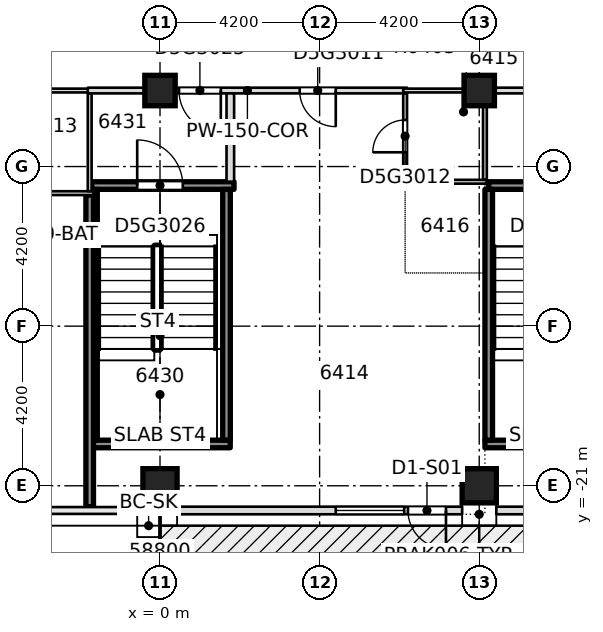
"""IFC4 building model, lengths in metres.
Left out: names, types, materials, properties, quantities, classifications, styles, units other than length and angle.
Written with IfcOpenShell. Run it as: python <this file> out.ifc"""

import sys

from ifc_helpers import new_model, si_unit, direction, frame, frame_2d, origin, origin_2d, place, context, subcontext, project, spatial, rectangle, extrude, element, fill, save


model = new_model("IFC4")
c1 = context("Model", 3, precision=1e-05, world=origin(), true_north=direction((0.0, 1.0)))
c2 = subcontext(c1, "Body", "Model", "MODEL_VIEW")
j1 = project(units=[si_unit("LENGTHUNIT", "METRE"), si_unit("PLANEANGLEUNIT", "RADIAN")], contexts=[c1])
p1 = place(None, origin())
s1 = spatial("IfcSite", under=j1, at=p1, CompositionType="ELEMENT")
p2 = place(p1, origin())
s2 = spatial("IfcBuilding", under=s1, at=p2, CompositionType="ELEMENT")
p3 = place(p2, frame((0.0, 0.0, 244.15)))
s3 = spatial("IfcBuildingStorey", under=s2, at=p3, CompositionType="ELEMENT", Elevation=244.15)
for number, where, z_axis, x_axis in (
    (1, (0.0, -21.0, -0.4), (0.0, 0.0, 1.0), (1.0, 0.0, 0.0)),
    (2, (8.4, -21.0, -0.4), (0.0, 0.0, 1.0), (1.0, 0.0, 0.0)),
):
    element("IfcColumn", number, at=place(p3, frame(where, z_axis=z_axis, x_axis=x_axis)), inside=s3, PredefinedType="COLUMN", context=c2, shape_type="SweptSolid", body=[
        extrude(rectangle(XDim=0.9, YDim=0.9, at=origin_2d()), origin(), (0.0, 0.0, 1.0), 3.45),
    ])
for number, where, z_axis, x_axis in (
    (3, (0.0, -10.6, -0.4), (0.0, 0.0, 1.0), (1.0, 0.0, 0.0)),
    (4, (8.4, -10.6, -0.4), (0.0, 0.0, 1.0), (1.0, 0.0, 0.0)),
):
    element("IfcColumn", number, at=place(p3, frame(where, z_axis=z_axis, x_axis=x_axis)), inside=s3, PredefinedType="COLUMN", context=c2, shape_type="SweptSolid", body=[
        extrude(rectangle(XDim=0.8, YDim=0.8, at=origin_2d()), origin(), (0.0, 0.0, 1.0), 3.45),
    ])
p4 = place(p3, frame((-1.848, -19.9, 0.0), z_axis=(0.0, 0.0, 1.0), x_axis=(1.0, 0.0, 0.0)))
e5 = element("IfcWall", 5, at=p4, inside=s3, PredefinedType="SOLIDWALL", context=c2, shape_type="SweptSolid", body=[
    extrude(rectangle(XDim=3.696, YDim=0.2, at=frame_2d((1.848, 0.0))), origin(), (0.0, 0.0, 1.0), 3.05),
])
p5 = place(p3, frame((-4.6, -13.3, 0.0), z_axis=(0.0, 0.0, 1.0), x_axis=(1.0, 0.0, 0.0)))
e6 = element("IfcWall", 6, at=p5, inside=s3, PredefinedType="PARTITIONING", context=c2, shape_type="SweptSolid", body=[
    extrude(rectangle(XDim=2.85, YDim=0.1, at=frame_2d((1.425, 0.0))), origin(), (0.0, 0.0, 1.0), 3.05),
])
p6 = place(p5, frame((0.25, 0.0, 0.0)))
e7 = element("IfcOpeningElement", 7, at=p6, cuts=e6, PredefinedType="OPENING", context=c2, shape_type="SweptSolid", body=[
    extrude(rectangle(XDim=0.85, YDim=2.1, at=frame_2d((0.425, 1.05))), frame((0.0, 0.06, 0.0), z_axis=(0.0, -1.0, 0.0), x_axis=(1.0, 0.0, 0.0)), (0.0, 0.0, 1.0), 0.12),
])
p7 = place(p3, frame((-1.798, -13.1, 0.0), z_axis=(0.0, 0.0, 1.0), x_axis=(1.0, 0.0, 0.0)))
e8 = element("IfcWall", 8, at=p7, inside=s3, PredefinedType="SOLIDWALL", context=c2, shape_type="SweptSolid", body=[
    extrude(rectangle(XDim=3.746, YDim=0.2, at=frame_2d((1.873, 0.0))), origin(), (0.0, 0.0, 1.0), 3.05),
])
p8 = place(p7, frame((1.198, 0.0, 0.0)))
e9 = element("IfcOpeningElement", 9, at=p8, cuts=e8, PredefinedType="OPENING", context=c2, shape_type="SweptSolid", body=[
    extrude(rectangle(XDim=1.2, YDim=2.1, at=frame_2d((0.6, 1.05))), frame((0.0, 0.11, 0.0), z_axis=(0.0, -1.0, 0.0), x_axis=(1.0, 0.0, 0.0)), (0.0, 0.0, 1.0), 0.22),
])
p9 = place(p3, frame((8.65, -13.1, 0.0), z_axis=(0.0, 0.0, 1.0), x_axis=(1.0, 0.0, 0.0)))
e10 = element("IfcWall", 10, at=p9, inside=s3, PredefinedType="SOLIDWALL", context=c2, shape_type="SweptSolid", body=[
    extrude(rectangle(XDim=3.5, YDim=0.2, at=frame_2d((1.75, 0.0))), origin(), (0.0, 0.0, 1.0), 3.05),
])
p10 = place(p9, frame((1.15, 0.0, 0.0)))
e11 = element("IfcOpeningElement", 11, at=p10, cuts=e10, PredefinedType="OPENING", context=c2, shape_type="SweptSolid", body=[
    extrude(rectangle(XDim=1.2, YDim=2.1, at=frame_2d((0.6, 1.05))), frame((0.0, 0.11, 0.0), z_axis=(0.0, -1.0, 0.0), x_axis=(1.0, 0.0, 0.0)), (0.0, 0.0, 1.0), 0.22),
])
p11 = place(p3, frame((6.4, -13.0, 0.0), z_axis=(0.0, 0.0, 1.0), x_axis=(1.0, 0.0, 0.0)))
e12 = element("IfcWall", 12, at=p11, inside=s3, PredefinedType="PARTITIONING", context=c2, shape_type="SweptSolid", body=[
    extrude(rectangle(XDim=2.2, YDim=0.1, at=frame_2d((1.1, 0.0))), origin(), (0.0, 0.0, 1.0), 3.05),
])
p12 = place(p3, frame((-4.6, -10.6, 0.0), z_axis=(0.0, 0.0, 1.0), x_axis=(1.0, 0.0, 0.0)))
e13 = element("IfcWall", 13, at=p12, inside=s3, PredefinedType="PARTITIONING", context=c2, shape_type="SweptSolid", body=[
    extrude(rectangle(XDim=2.8, YDim=0.1, at=frame_2d((1.4, 0.0))), origin(), (0.0, 0.0, 1.0), 3.05),
])
p13 = place(p3, frame((-1.9, -10.6, 0.0), z_axis=(0.0, 0.0, 1.0), x_axis=(1.0, 0.0, 0.0)))
e14 = element("IfcWall", 14, at=p13, inside=s3, PredefinedType="PARTITIONING", context=c2, shape_type="SweptSolid", body=[
    extrude(rectangle(XDim=8.4, YDim=0.15, at=frame_2d((4.2, 0.0))), origin(), (0.0, 0.0, 1.0), 3.05),
])
p14 = place(p13, frame((5.575, 0.0, 0.0)))
e15 = element("IfcOpeningElement", 15, at=p14, cuts=e14, PredefinedType="OPENING", context=c2, shape_type="SweptSolid", body=[
    extrude(rectangle(XDim=0.95, YDim=2.1, at=frame_2d((0.475, 1.05))), frame((0.0, 0.085, 0.0), z_axis=(0.0, -1.0, 0.0), x_axis=(1.0, 0.0, 0.0)), (0.0, 0.0, 1.0), 0.17),
])
p15 = place(p13, frame((2.4, 0.0, 0.0)))
e16 = element("IfcOpeningElement", 16, at=p15, cuts=e14, PredefinedType="OPENING", context=c2, shape_type="SweptSolid", body=[
    extrude(rectangle(XDim=1.1, YDim=2.1, at=frame_2d((0.55, 1.05))), frame((0.0, 0.085, 0.0), z_axis=(0.0, -1.0, 0.0), x_axis=(1.0, 0.0, 0.0)), (0.0, 0.0, 1.0), 0.17),
])
p16 = place(p3, frame((6.4, -10.6, 0.0), z_axis=(0.0, 0.0, 1.0), x_axis=(1.0, 0.0, 0.0)))
e17 = element("IfcWall", 17, at=p16, inside=s3, PredefinedType="PARTITIONING", context=c2, shape_type="SweptSolid", body=[
    extrude(rectangle(XDim=2.2, YDim=0.1, at=frame_2d((1.1, 0.0))), origin(), (0.0, 0.0, 1.0), 3.05),
])
p17 = place(p3, frame((8.5, -10.6, 0.0), z_axis=(0.0, 0.0, 1.0), x_axis=(1.0, 0.0, 0.0)))
e18 = element("IfcWall", 18, at=p17, inside=s3, PredefinedType="PARTITIONING", context=c2, shape_type="SweptSolid", body=[
    extrude(rectangle(XDim=3.75, YDim=0.15, at=frame_2d((1.875, 0.0))), origin(), (0.0, 0.0, 1.0), 3.05),
])
p18 = place(p17, frame((1.35, 0.0, 0.0)))
e19 = element("IfcOpeningElement", 19, at=p18, cuts=e18, PredefinedType="OPENING", context=c2, shape_type="SweptSolid", body=[
    extrude(rectangle(XDim=1.1, YDim=2.1, at=frame_2d((0.55, 1.05))), frame((0.0, 0.085, 0.0), z_axis=(0.0, -1.0, 0.0), x_axis=(1.0, 0.0, 0.0)), (0.0, 0.0, 1.0), 0.17),
])
p19 = place(p3, frame((-1.85, -13.25, 0.0), z_axis=(0.0, 0.0, 1.0), x_axis=(0.0, 1.0, 0.0)))
e20 = element("IfcWall", 20, at=p19, inside=s3, PredefinedType="PARTITIONING", context=c2, shape_type="SweptSolid", body=[
    extrude(rectangle(XDim=2.575, YDim=0.1, at=frame_2d((1.288, 0.0))), origin(), (0.0, 0.0, 1.0), 3.05),
])
for number, where, z_axis, x_axis in (
    (21, (-1.75, -19.798, 0.0), (0.0, 0.0, 1.0), (0.0, 1.0, 0.0)),
    (22, (1.75, -19.798, 0.0), (0.0, 0.0, 1.0), (0.0, 1.0, 0.0)),
):
    element("IfcWall", number, at=place(p3, frame(where, z_axis=z_axis, x_axis=x_axis)), inside=s3, PredefinedType="SOLIDWALL", context=c2, shape_type="SweptSolid", body=[
        extrude(rectangle(XDim=6.596, YDim=0.2, at=frame_2d((3.298, 0.0))), origin(), (0.0, 0.0, 1.0), 3.05),
    ])
p20 = place(p3, frame((1.85, -12.998, 0.0), z_axis=(0.0, 0.0, 1.0), x_axis=(0.0, 1.0, 0.0)))
e23 = element("IfcWall", 23, at=p20, inside=s3, PredefinedType="PARTITIONING", context=c2, shape_type="SweptSolid", body=[
    extrude(rectangle(XDim=2.323, YDim=0.2, at=frame_2d((1.162, 0.0))), origin(), (0.0, 0.0, 1.0), 3.05),
])
p21 = place(p3, frame((6.45, -12.95, 0.0), z_axis=(0.0, 0.0, 1.0), x_axis=(0.0, 1.0, 0.0)))
e24 = element("IfcWall", 24, at=p21, inside=s3, PredefinedType="PARTITIONING", context=c2, shape_type="SweptSolid", body=[
    extrude(rectangle(XDim=2.275, YDim=0.1, at=frame_2d((1.137, 0.0))), origin(), (0.0, 0.0, 1.0), 3.05),
])
p22 = place(p21, frame((0.725, 0.0, 0.0)))
e25 = element("IfcOpeningElement", 25, at=p22, cuts=e24, PredefinedType="OPENING", context=c2, shape_type="SweptSolid", body=[
    extrude(rectangle(XDim=0.85, YDim=2.1, at=frame_2d((0.425, 1.05))), frame((0.0, 0.06, 0.0), z_axis=(0.0, -1.0, 0.0), x_axis=(1.0, 0.0, 0.0)), (0.0, 0.0, 1.0), 0.12),
])
p23 = place(p3, frame((8.55, -12.95, 0.0), z_axis=(0.0, 0.0, 1.0), x_axis=(0.0, 1.0, 0.0)))
e26 = element("IfcWall", 26, at=p23, inside=s3, PredefinedType="PARTITIONING", context=c2, shape_type="SweptSolid", body=[
    extrude(rectangle(XDim=2.275, YDim=0.1, at=frame_2d((1.137, 0.0))), origin(), (0.0, 0.0, 1.0), 3.05),
])
p24 = place(p3, frame((0.45, -21.65, 0.0), z_axis=(0.0, 0.0, 1.0), x_axis=(1.0, 0.0, 0.0)))
e27 = element("IfcWall", 27, at=p24, inside=s3, PredefinedType="STANDARD", context=c2, shape_type="SweptSolid", body=[
    extrude(rectangle(XDim=7.5, YDim=0.2, at=frame_2d((3.75, 0.0))), origin(), (0.0, 0.0, 1.0), 3.05),
])
p25 = place(p24, frame((4.175, 0.0, 0.2)))
e28 = element("IfcOpeningElement", 28, at=p25, cuts=e27, PredefinedType="OPENING", context=c2, shape_type="SweptSolid", body=[
    extrude(rectangle(XDim=1.8, YDim=2.65, at=frame_2d((0.9, 1.325))), frame((0.0, 0.11, 0.0), z_axis=(0.0, -1.0, 0.0), x_axis=(1.0, 0.0, 0.0)), (0.0, 0.0, 1.0), 0.22),
])
p26 = place(p24, frame((6.075, 0.0, 0.0)))
e29 = element("IfcOpeningElement", 29, at=p26, cuts=e27, PredefinedType="OPENING", context=c2, shape_type="SweptSolid", body=[
    extrude(rectangle(XDim=1.0, YDim=2.4, at=frame_2d((0.5, 1.2))), frame((0.0, 0.11, 0.0), z_axis=(0.0, -1.0, 0.0), x_axis=(1.0, 0.0, 0.0)), (0.0, 0.0, 1.0), 0.22),
])
p27 = place(p3, frame((8.85, -21.65, 0.0), z_axis=(0.0, 0.0, 1.0), x_axis=(1.0, 0.0, 0.0)))
e30 = element("IfcWall", 30, at=p27, inside=s3, PredefinedType="STANDARD", context=c2, shape_type="SweptSolid", body=[
    extrude(rectangle(XDim=6.7, YDim=0.2, at=frame_2d((3.35, 0.0))), origin(), (0.0, 0.0, 1.0), 3.05),
])
p28 = place(p27, frame((4.725, 0.0, 0.0)))
e31 = element("IfcOpeningElement", 31, at=p28, cuts=e30, PredefinedType="OPENING", context=c2, shape_type="SweptSolid", body=[
    extrude(rectangle(XDim=1.0, YDim=2.4, at=frame_2d((0.5, 1.2))), frame((0.0, 0.11, 0.0), z_axis=(0.0, -1.0, 0.0), x_axis=(1.0, 0.0, 0.0)), (0.0, 0.0, 1.0), 0.22),
])
p29 = place(p3, frame((8.55, -19.9, 0.0), z_axis=(0.0, 0.0, 1.0), x_axis=(1.0, 0.0, 0.0)))
e32 = element("IfcWall", 32, at=p29, inside=s3, PredefinedType="SOLIDWALL", context=c2, shape_type="SweptSolid", body=[
    extrude(rectangle(XDim=3.7, YDim=0.2, at=frame_2d((1.85, 0.0))), origin(), (0.0, 0.0, 1.0), 3.05),
])
p30 = place(p3, frame((8.65, -19.8, 0.0), z_axis=(0.0, 0.0, 1.0), x_axis=(0.0, 1.0, 0.0)))
e33 = element("IfcWall", 33, at=p30, inside=s3, PredefinedType="SOLIDWALL", context=c2, shape_type="SweptSolid", body=[
    extrude(rectangle(XDim=6.6, YDim=0.2, at=frame_2d((3.3, 0.0))), origin(), (0.0, 0.0, 1.0), 3.05),
])
p31 = place(p3, frame((-1.85, -21.55, 0.0), z_axis=(0.0, 0.0, 1.0), x_axis=(0.0, 1.0, 0.0)))
e34 = element("IfcWall", 34, at=p31, inside=s3, PredefinedType="SOLIDWALL", context=c2, shape_type="SweptSolid", body=[
    extrude(rectangle(XDim=8.2, YDim=0.2, at=frame_2d((4.1, 0.0))), origin(), (0.0, 0.0, 1.0), 3.05),
])
p32 = place(p14, origin())
e35 = element("IfcDoor", 35, at=p32, inside=s3, OperationType="SINGLE_SWING_LEFT", PredefinedType="DOOR", context=c2, shape_type="SweptSolid", body=[
    extrude(rectangle(XDim=0.95, YDim=2.1, at=frame_2d((0.475, 1.05))), frame((0.0, 0.025, 0.0), z_axis=(0.0, -1.0, 0.0), x_axis=(1.0, 0.0, 0.0)), (0.0, 0.0, 1.0), 0.05),
])
fill(e15, e35)
p33 = place(p22, origin())
e36 = element("IfcDoor", 36, at=p33, inside=s3, OperationType="SINGLE_SWING_RIGHT", PredefinedType="DOOR", context=c2, shape_type="SweptSolid", body=[
    extrude(rectangle(XDim=0.85, YDim=2.1, at=frame_2d((0.425, 1.05))), frame((0.0, 0.025, 0.0), z_axis=(0.0, -1.0, 0.0), x_axis=(1.0, 0.0, 0.0)), (0.0, 0.0, 1.0), 0.05),
])
fill(e25, e36)
p34 = place(p15, origin())
e37 = element("IfcDoor", 37, at=p34, inside=s3, OperationType="SINGLE_SWING_LEFT", PredefinedType="DOOR", context=c2, shape_type="SweptSolid", body=[
    extrude(rectangle(XDim=1.1, YDim=2.1, at=frame_2d((0.55, 1.05))), frame((0.0, 0.025, 0.0), z_axis=(0.0, -1.0, 0.0), x_axis=(1.0, 0.0, 0.0)), (0.0, 0.0, 1.0), 0.05),
])
fill(e16, e37)
p35 = place(p8, origin())
e38 = element("IfcDoor", 38, at=p35, inside=s3, OperationType="SINGLE_SWING_RIGHT", PredefinedType="DOOR", context=c2, shape_type="SweptSolid", body=[
    extrude(rectangle(XDim=1.2, YDim=2.1, at=frame_2d((0.6, 1.05))), frame((0.0, 0.025, 0.0), z_axis=(0.0, -1.0, 0.0), x_axis=(1.0, 0.0, 0.0)), (0.0, 0.0, 1.0), 0.05),
])
fill(e9, e38)
p36 = place(p25, origin())
e39 = element("IfcWindow", 39, at=p36, inside=s3, PartitioningType="SINGLE_PANEL", PredefinedType="WINDOW", context=c2, shape_type="SweptSolid", body=[
    extrude(rectangle(XDim=1.8, YDim=2.65, at=frame_2d((0.9, 1.325))), frame((0.0, 0.03, 0.0), z_axis=(0.0, -1.0, 0.0), x_axis=(1.0, 0.0, 0.0)), (0.0, 0.0, 1.0), 0.06),
])
fill(e28, e39)
p37 = place(p26, origin())
e40 = element("IfcDoor", 40, at=p37, inside=s3, OperationType="SINGLE_SWING_LEFT", PredefinedType="DOOR", context=c2, shape_type="SweptSolid", body=[
    extrude(rectangle(XDim=1.0, YDim=2.4, at=frame_2d((0.5, 1.2))), frame((0.0, 0.025, 0.0), z_axis=(0.0, -1.0, 0.0), x_axis=(1.0, 0.0, 0.0)), (0.0, 0.0, 1.0), 0.05),
])
fill(e29, e40)
save(model, sys.argv[1])
